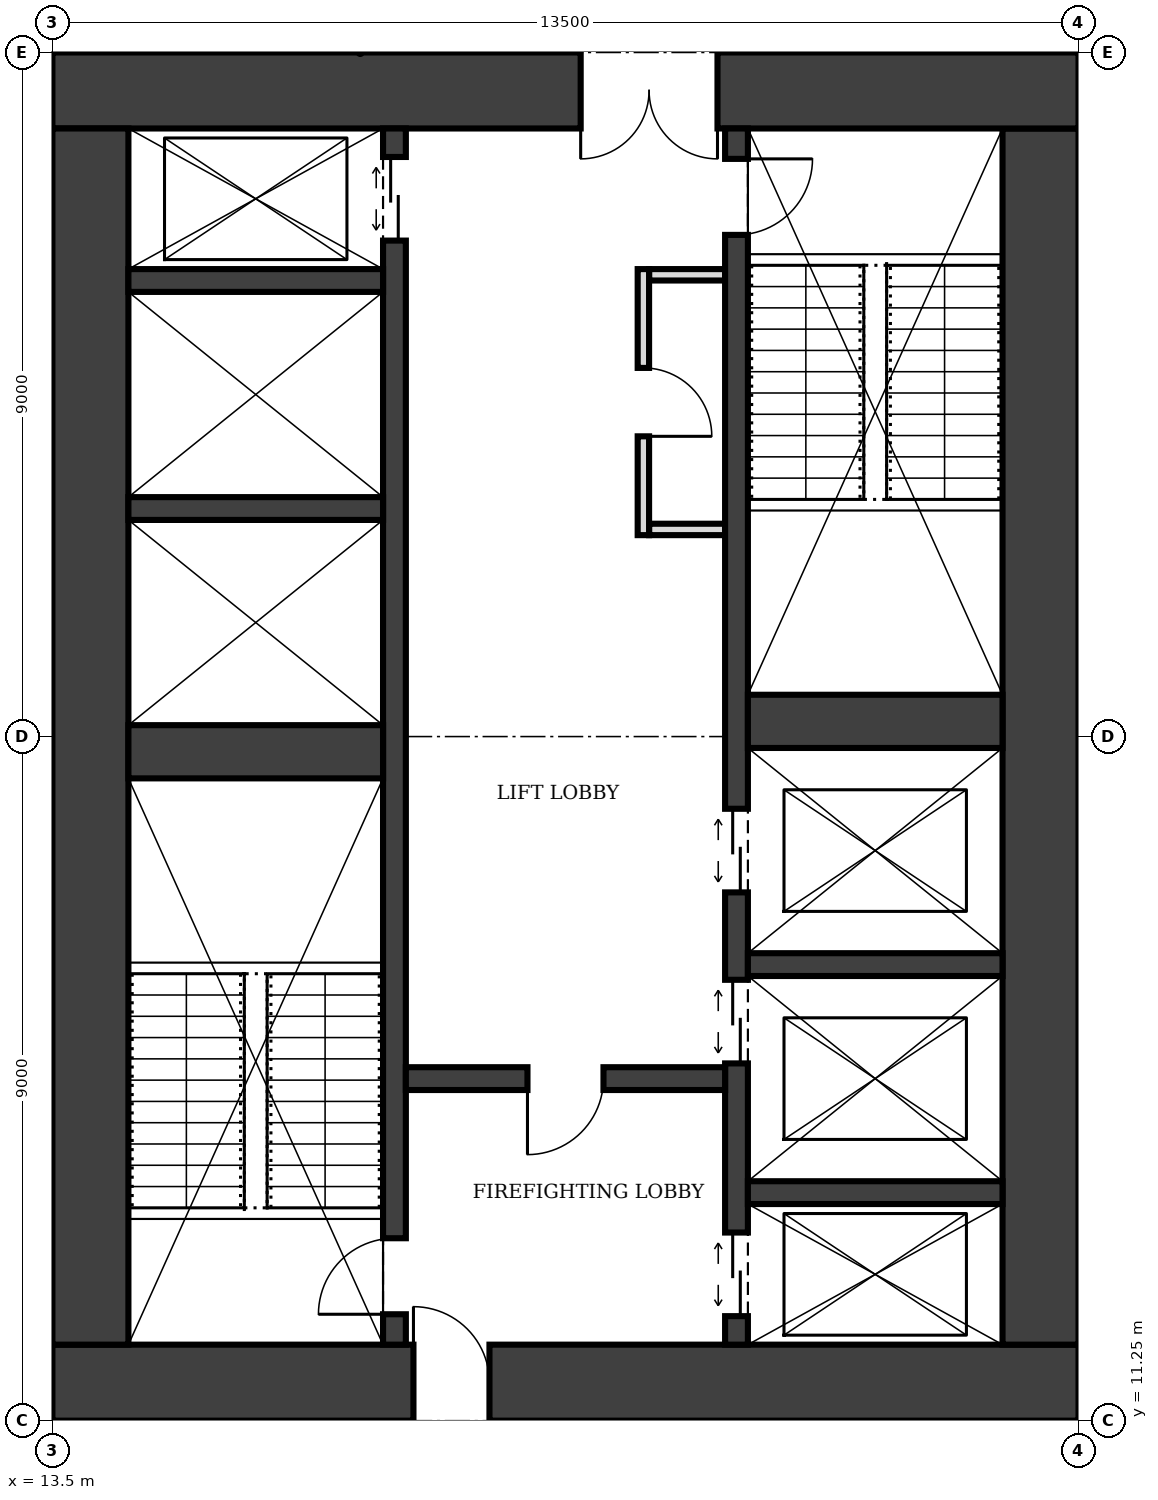
"""IFC4 building model, lengths in metres.
Left out: names, types, materials, properties, quantities, classifications, styles, units other than length and angle.
Written with IfcOpenShell. Run it as: python <this file> out.ifc"""

import sys

from ifc_helpers import new_model, si_unit, direction, frame, frame_2d, origin, place, context, subcontext, project, spatial, rectangle, extrude, element, fill, save


model = new_model("IFC4")
c1 = context("Model", 3, precision=1e-05, world=origin(), true_north=direction((0.0, 1.0)))
c2 = subcontext(c1, "Body", "Model", "MODEL_VIEW")
j1 = project(units=[si_unit("LENGTHUNIT", "METRE"), si_unit("PLANEANGLEUNIT", "RADIAN")], contexts=[c1])
p1 = place(None, origin())
s1 = spatial("IfcSite", under=j1, at=p1, CompositionType="ELEMENT")
p2 = place(p1, origin())
s2 = spatial("IfcBuilding", under=s1, at=p2, CompositionType="ELEMENT")
p3 = place(p2, frame((0.0, 0.0, 109.0)))
s3 = spatial("IfcBuildingStorey", under=s2, at=p3, CompositionType="ELEMENT", Elevation=109.0)
p4 = place(p3, frame((13.5, 11.75, 0.0), z_axis=(0.0, 0.0, 1.0), x_axis=(1.0, 0.0, 0.0)))
e1 = element("IfcWall", 1, at=p4, inside=s3, PredefinedType="SHEAR", context=c2, shape_type="SweptSolid", body=[
    extrude(rectangle(XDim=13.5, YDim=1.0, at=frame_2d((6.75, 0.0))), origin(), (0.0, 0.0, 1.0), 4.0),
])
p5 = place(p4, frame((4.75, 0.0, 0.0)))
e2 = element("IfcOpeningElement", 2, at=p5, cuts=e1, PredefinedType="OPENING", context=c2, shape_type="SweptSolid", body=[
    extrude(rectangle(XDim=1.0, YDim=2.1, at=frame_2d((0.5, 1.05))), frame((0.0, 0.51, 0.0), z_axis=(0.0, -1.0, 0.0), x_axis=(1.0, 0.0, 0.0)), (0.0, 0.0, 1.0), 1.02),
])
p6 = place(p3, frame((26.5, 12.25, 0.0), z_axis=(0.0, 0.0, 1.0), x_axis=(0.0, 1.0, 0.0)))
e3 = element("IfcWall", 3, at=p6, inside=s3, PredefinedType="SHEAR", context=c2, shape_type="SweptSolid", body=[
    extrude(rectangle(XDim=16.0, YDim=1.0, at=frame_2d((8.0, 0.0))), origin(), (0.0, 0.0, 1.0), 4.0),
])
p7 = place(p3, frame((27.0, 28.75, 0.0), z_axis=(0.0, 0.0, 1.0), x_axis=(-1.0, 0.0, 0.0)))
e4 = element("IfcWall", 4, at=p7, inside=s3, PredefinedType="SHEAR", context=c2, shape_type="SweptSolid", body=[
    extrude(rectangle(XDim=13.5, YDim=1.0, at=frame_2d((6.75, 0.0))), origin(), (0.0, 0.0, 1.0), 4.0),
])
p8 = place(p7, frame((4.75, 0.0, 0.0)))
e5 = element("IfcOpeningElement", 5, at=p8, cuts=e4, PredefinedType="OPENING", context=c2, shape_type="SweptSolid", body=[
    extrude(rectangle(XDim=1.8, YDim=2.1, at=frame_2d((0.9, 1.05))), frame((0.0, 0.51, 0.0), z_axis=(0.0, -1.0, 0.0), x_axis=(1.0, 0.0, 0.0)), (0.0, 0.0, 1.0), 1.02),
])
p9 = place(p3, frame((14.0, 28.25, 0.0), z_axis=(0.0, 0.0, 1.0), x_axis=(0.0, -1.0, 0.0)))
e6 = element("IfcWall", 6, at=p9, inside=s3, PredefinedType="SHEAR", context=c2, shape_type="SweptSolid", body=[
    extrude(rectangle(XDim=16.0, YDim=1.0, at=frame_2d((8.0, 0.0))), origin(), (0.0, 0.0, 1.0), 4.0),
])
p10 = place(p3, frame((18.0, 12.25, 0.0), z_axis=(0.0, 0.0, 1.0), x_axis=(0.0, 1.0, 0.0)))
e7 = element("IfcWall", 7, at=p10, inside=s3, PredefinedType="SHEAR", context=c2, shape_type="SweptSolid", body=[
    extrude(rectangle(XDim=16.0, YDim=0.3, at=frame_2d((8.0, 0.0))), origin(), (0.0, 0.0, 1.0), 4.0),
])
p11 = place(p10, frame((0.4, 0.0, 0.0)))
e8 = element("IfcOpeningElement", 8, at=p11, cuts=e7, PredefinedType="OPENING", context=c2, shape_type="SweptSolid", body=[
    extrude(rectangle(XDim=1.0, YDim=2.1, at=frame_2d((0.5, 1.05))), frame((0.0, 0.16, 0.0), z_axis=(0.0, -1.0, 0.0), x_axis=(1.0, 0.0, 0.0)), (0.0, 0.0, 1.0), 0.32),
])
p12 = place(p10, frame((14.525, 0.0, 0.0)))
e9 = element("IfcOpeningElement", 9, at=p12, cuts=e7, PredefinedType="OPENING", context=c2, shape_type="SweptSolid", body=[
    extrude(rectangle(XDim=1.1, YDim=2.1, at=frame_2d((0.55, 1.05))), frame((0.0, 0.16, 0.0), z_axis=(0.0, -1.0, 0.0), x_axis=(1.0, 0.0, 0.0)), (0.0, 0.0, 1.0), 0.32),
])
p13 = place(p3, frame((22.5, 12.25, 0.0), z_axis=(0.0, 0.0, 1.0), x_axis=(0.0, 1.0, 0.0)))
e10 = element("IfcWall", 10, at=p13, inside=s3, PredefinedType="SHEAR", context=c2, shape_type="SweptSolid", body=[
    extrude(rectangle(XDim=16.0, YDim=0.3, at=frame_2d((8.0, 0.0))), origin(), (0.0, 0.0, 1.0), 4.0),
])
p14 = place(p13, frame((14.6, 0.0, 0.0)))
e11 = element("IfcOpeningElement", 11, at=p14, cuts=e10, PredefinedType="OPENING", context=c2, shape_type="SweptSolid", body=[
    extrude(rectangle(XDim=1.0, YDim=2.1, at=frame_2d((0.5, 1.05))), frame((0.0, 0.16, 0.0), z_axis=(0.0, -1.0, 0.0), x_axis=(1.0, 0.0, 0.0)), (0.0, 0.0, 1.0), 0.32),
])
p15 = place(p13, frame((0.375, 0.0, 0.0)))
e12 = element("IfcOpeningElement", 12, at=p15, cuts=e10, PredefinedType="OPENING", context=c2, shape_type="SweptSolid", body=[
    extrude(rectangle(XDim=1.1, YDim=2.1, at=frame_2d((0.55, 1.05))), frame((0.0, 0.16, 0.0), z_axis=(0.0, -1.0, 0.0), x_axis=(1.0, 0.0, 0.0)), (0.0, 0.0, 1.0), 0.32),
])
p16 = place(p13, frame((3.7, 0.0, 0.0)))
e13 = element("IfcOpeningElement", 13, at=p16, cuts=e10, PredefinedType="OPENING", context=c2, shape_type="SweptSolid", body=[
    extrude(rectangle(XDim=1.1, YDim=2.1, at=frame_2d((0.55, 1.05))), frame((0.0, 0.16, 0.0), z_axis=(0.0, -1.0, 0.0), x_axis=(1.0, 0.0, 0.0)), (0.0, 0.0, 1.0), 0.32),
])
p17 = place(p13, frame((5.95, 0.0, 0.0)))
e14 = element("IfcOpeningElement", 14, at=p17, cuts=e10, PredefinedType="OPENING", context=c2, shape_type="SweptSolid", body=[
    extrude(rectangle(XDim=1.1, YDim=2.1, at=frame_2d((0.55, 1.05))), frame((0.0, 0.16, 0.0), z_axis=(0.0, -1.0, 0.0), x_axis=(1.0, 0.0, 0.0)), (0.0, 0.0, 1.0), 0.32),
])
p18 = place(p3, frame((14.5, 20.05, 0.0), z_axis=(0.0, 0.0, 1.0), x_axis=(1.0, 0.0, 0.0)))
e15 = element("IfcWall", 15, at=p18, inside=s3, PredefinedType="SHEAR", context=c2, shape_type="SweptSolid", body=[
    extrude(rectangle(XDim=3.35, YDim=0.7, at=frame_2d((1.675, 0.0))), origin(), (0.0, 0.0, 1.0), 4.0),
])
p19 = place(p3, frame((18.15, 15.75, 0.0), z_axis=(0.0, 0.0, 1.0), x_axis=(1.0, 0.0, 0.0)))
e16 = element("IfcWall", 16, at=p19, inside=s3, PredefinedType="SHEAR", context=c2, shape_type="SweptSolid", body=[
    extrude(rectangle(XDim=4.2, YDim=0.3, at=frame_2d((2.1, 0.0))), origin(), (0.0, 0.0, 1.0), 4.0),
])
p20 = place(p19, frame((1.6, 0.0, 0.0)))
e17 = element("IfcOpeningElement", 17, at=p20, cuts=e16, PredefinedType="OPENING", context=c2, shape_type="SweptSolid", body=[
    extrude(rectangle(XDim=1.0, YDim=2.1, at=frame_2d((0.5, 1.05))), frame((0.0, 0.16, 0.0), z_axis=(0.0, -1.0, 0.0), x_axis=(1.0, 0.0, 0.0)), (0.0, 0.0, 1.0), 0.32),
])
for number, where, z_axis, x_axis in (
    (18, (22.65, 14.25, 0.0), (0.0, 0.0, 1.0), (1.0, 0.0, 0.0)),
    (19, (22.65, 17.25, 0.0), (0.0, 0.0, 1.0), (1.0, 0.0, 0.0)),
):
    element("IfcWall", number, at=place(p3, frame(where, z_axis=z_axis, x_axis=x_axis)), inside=s3, PredefinedType="SHEAR", context=c2, shape_type="SweptSolid", body=[
        extrude(rectangle(XDim=3.35, YDim=0.3, at=frame_2d((1.675, 0.0))), origin(), (0.0, 0.0, 1.0), 4.0),
    ])
p21 = place(p3, frame((22.65, 20.45, 0.0), z_axis=(0.0, 0.0, 1.0), x_axis=(1.0, 0.0, 0.0)))
e20 = element("IfcWall", 20, at=p21, inside=s3, PredefinedType="SHEAR", context=c2, shape_type="SweptSolid", body=[
    extrude(rectangle(XDim=3.35, YDim=0.7, at=frame_2d((1.675, 0.0))), origin(), (0.0, 0.0, 1.0), 4.0),
])
for number, where, z_axis, x_axis in (
    (21, (14.5, 23.25, 0.0), (0.0, 0.0, 1.0), (1.0, 0.0, 0.0)),
    (22, (14.5, 26.25, 0.0), (0.0, 0.0, 1.0), (1.0, 0.0, 0.0)),
):
    element("IfcWall", number, at=place(p3, frame(where, z_axis=z_axis, x_axis=x_axis)), inside=s3, PredefinedType="SHEAR", context=c2, shape_type="SweptSolid", body=[
        extrude(rectangle(XDim=3.35, YDim=0.3, at=frame_2d((1.675, 0.0))), origin(), (0.0, 0.0, 1.0), 4.0),
    ])
p22 = place(p3, frame((21.275, 22.9, 0.0), z_axis=(0.0, 0.0, 1.0), x_axis=(0.0, 1.0, 0.0)))
e23 = element("IfcWall", 23, at=p22, inside=s3, PredefinedType="PARTITIONING", context=c2, shape_type="SweptSolid", body=[
    extrude(rectangle(XDim=3.5, YDim=0.15, at=frame_2d((1.75, 0.0))), origin(), (0.0, 0.0, 1.0), 3.75),
])
p23 = place(p22, frame((1.3, 0.0, 0.0)))
e24 = element("IfcOpeningElement", 24, at=p23, cuts=e23, PredefinedType="OPENING", context=c2, shape_type="SweptSolid", body=[
    extrude(rectangle(XDim=0.9, YDim=2.1, at=frame_2d((0.45, 1.05))), frame((0.0, 0.085, 0.0), z_axis=(0.0, -1.0, 0.0), x_axis=(1.0, 0.0, 0.0)), (0.0, 0.0, 1.0), 0.17),
])
for number, where, z_axis, x_axis in (
    (25, (21.35, 22.975, 0.0), (0.0, 0.0, 1.0), (1.0, 0.0, 0.0)),
    (26, (21.35, 26.325, 0.0), (0.0, 0.0, 1.0), (1.0, 0.0, 0.0)),
):
    element("IfcWall", number, at=place(p3, frame(where, z_axis=z_axis, x_axis=x_axis)), inside=s3, PredefinedType="PARTITIONING", context=c2, shape_type="SweptSolid", body=[
        extrude(rectangle(XDim=1.0, YDim=0.15, at=frame_2d((0.5, 0.0))), origin(), (0.0, 0.0, 1.0), 3.75),
    ])
p24 = place(p5, origin())
e27 = element("IfcDoor", 27, at=p24, inside=s3, OperationType="SINGLE_SWING_LEFT", PredefinedType="DOOR", context=c2, shape_type="SweptSolid", body=[
    extrude(rectangle(XDim=1.0, YDim=2.1, at=frame_2d((0.5, 1.05))), frame((0.0, 0.025, 0.0), z_axis=(0.0, -1.0, 0.0), x_axis=(1.0, 0.0, 0.0)), (0.0, 0.0, 1.0), 0.05),
])
fill(e2, e27)
p25 = place(p8, origin())
e28 = element("IfcDoor", 28, at=p25, inside=s3, OperationType="DOUBLE_DOOR_SINGLE_SWING", PredefinedType="DOOR", context=c2, shape_type="SweptSolid", body=[
    extrude(rectangle(XDim=1.8, YDim=2.1, at=frame_2d((0.9, 1.05))), frame((0.0, 0.025, 0.0), z_axis=(0.0, -1.0, 0.0), x_axis=(1.0, 0.0, 0.0)), (0.0, 0.0, 1.0), 0.05),
])
fill(e5, e28)
p26 = place(p20, frame((1.0, 0.0, 0.0), z_axis=(0.0, 0.0, 1.0), x_axis=(-1.0, 0.0, 0.0)))
e29 = element("IfcDoor", 29, at=p26, inside=s3, OperationType="SINGLE_SWING_RIGHT", PredefinedType="DOOR", context=c2, shape_type="SweptSolid", body=[
    extrude(rectangle(XDim=1.0, YDim=2.1, at=frame_2d((0.5, 1.05))), frame((0.0, 0.025, 0.0), z_axis=(0.0, -1.0, 0.0), x_axis=(1.0, 0.0, 0.0)), (0.0, 0.0, 1.0), 0.05),
])
fill(e17, e29)
p27 = place(p11, origin())
e30 = element("IfcDoor", 30, at=p27, inside=s3, OperationType="SINGLE_SWING_LEFT", PredefinedType="DOOR", context=c2, shape_type="SweptSolid", body=[
    extrude(rectangle(XDim=1.0, YDim=2.1, at=frame_2d((0.5, 1.05))), frame((0.0, 0.025, 0.0), z_axis=(0.0, -1.0, 0.0), x_axis=(1.0, 0.0, 0.0)), (0.0, 0.0, 1.0), 0.05),
])
fill(e8, e30)
p28 = place(p14, frame((1.0, 0.0, 0.0), z_axis=(0.0, 0.0, 1.0), x_axis=(-1.0, 0.0, 0.0)))
e31 = element("IfcDoor", 31, at=p28, inside=s3, OperationType="SINGLE_SWING_LEFT", PredefinedType="DOOR", context=c2, shape_type="SweptSolid", body=[
    extrude(rectangle(XDim=1.0, YDim=2.1, at=frame_2d((0.5, 1.05))), frame((0.0, 0.025, 0.0), z_axis=(0.0, -1.0, 0.0), x_axis=(1.0, 0.0, 0.0)), (0.0, 0.0, 1.0), 0.05),
])
fill(e11, e31)
p29 = place(p15, origin())
e32 = element("IfcDoor", 32, at=p29, inside=s3, OperationType="DOUBLE_DOOR_SLIDING", PredefinedType="DOOR", context=c2, shape_type="SweptSolid", body=[
    extrude(rectangle(XDim=1.1, YDim=2.1, at=frame_2d((0.55, 1.05))), frame((0.0, 0.025, 0.0), z_axis=(0.0, -1.0, 0.0), x_axis=(1.0, 0.0, 0.0)), (0.0, 0.0, 1.0), 0.05),
])
fill(e12, e32)
p30 = place(p12, origin())
e33 = element("IfcDoor", 33, at=p30, inside=s3, OperationType="DOUBLE_DOOR_SLIDING", PredefinedType="DOOR", context=c2, shape_type="SweptSolid", body=[
    extrude(rectangle(XDim=1.1, YDim=2.1, at=frame_2d((0.55, 1.05))), frame((0.0, 0.025, 0.0), z_axis=(0.0, -1.0, 0.0), x_axis=(1.0, 0.0, 0.0)), (0.0, 0.0, 1.0), 0.05),
])
fill(e9, e33)
p31 = place(p16, origin())
e34 = element("IfcDoor", 34, at=p31, inside=s3, OperationType="DOUBLE_DOOR_SLIDING", PredefinedType="DOOR", context=c2, shape_type="SweptSolid", body=[
    extrude(rectangle(XDim=1.1, YDim=2.1, at=frame_2d((0.55, 1.05))), frame((0.0, 0.025, 0.0), z_axis=(0.0, -1.0, 0.0), x_axis=(1.0, 0.0, 0.0)), (0.0, 0.0, 1.0), 0.05),
])
fill(e13, e34)
p32 = place(p17, origin())
e35 = element("IfcDoor", 35, at=p32, inside=s3, OperationType="DOUBLE_DOOR_SLIDING", PredefinedType="DOOR", context=c2, shape_type="SweptSolid", body=[
    extrude(rectangle(XDim=1.1, YDim=2.1, at=frame_2d((0.55, 1.05))), frame((0.0, 0.025, 0.0), z_axis=(0.0, -1.0, 0.0), x_axis=(1.0, 0.0, 0.0)), (0.0, 0.0, 1.0), 0.05),
])
fill(e14, e35)
p33 = place(p23, frame((0.9, 0.0, 0.0), z_axis=(0.0, 0.0, 1.0), x_axis=(-1.0, 0.0, 0.0)))
e36 = element("IfcDoor", 36, at=p33, inside=s3, OperationType="SINGLE_SWING_RIGHT", PredefinedType="DOOR", context=c2, shape_type="SweptSolid", body=[
    extrude(rectangle(XDim=0.9, YDim=2.1, at=frame_2d((0.45, 1.05))), frame((0.0, 0.025, 0.0), z_axis=(0.0, -1.0, 0.0), x_axis=(1.0, 0.0, 0.0)), (0.0, 0.0, 1.0), 0.05),
])
fill(e24, e36)
save(model, sys.argv[1])
